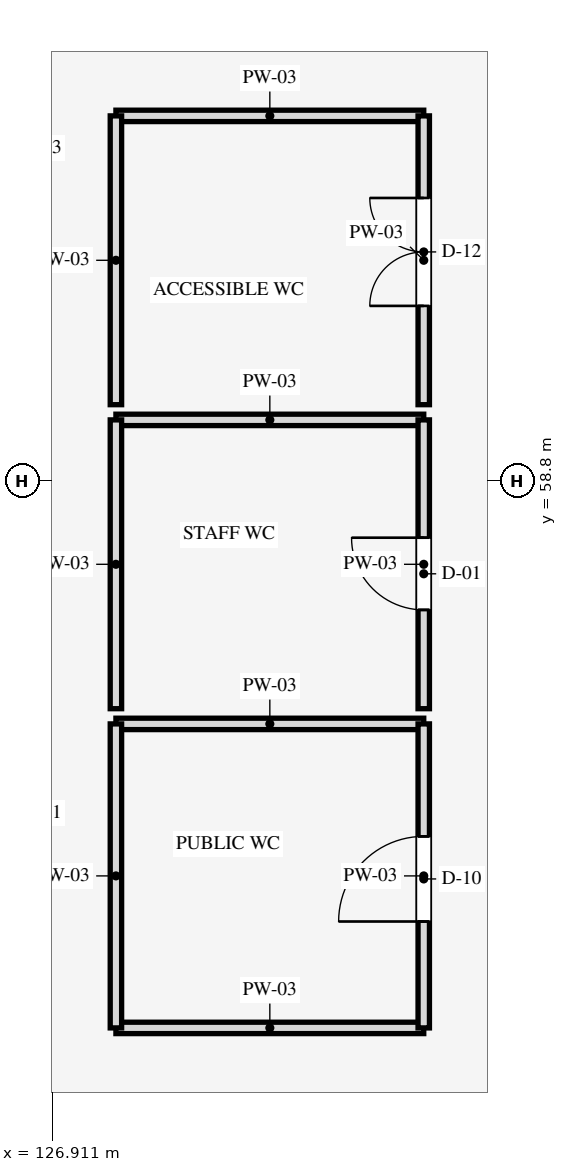
"""IFC4 building model, lengths in metres.
Left out: names, types, materials, properties, quantities, classifications, styles, units other than length and angle.
Written with IfcOpenShell. Run it as: python <this file> out.ifc"""

import sys

from ifc_helpers import new_model, si_unit, direction, frame, frame_2d, origin, place, context, subcontext, project, spatial, rectangle, extrude, element, fill, save


model = new_model("IFC4")
c1 = context("Model", 3, precision=1e-05, world=origin(), true_north=direction((0.0, 1.0)))
c2 = subcontext(c1, "Body", "Model", "MODEL_VIEW")
j1 = project(units=[si_unit("LENGTHUNIT", "METRE"), si_unit("PLANEANGLEUNIT", "RADIAN")], contexts=[c1])
p1 = place(None, origin())
s1 = spatial("IfcSite", under=j1, at=p1, CompositionType="ELEMENT")
p2 = place(p1, origin())
s2 = spatial("IfcBuilding", under=s1, at=p2, CompositionType="ELEMENT")
p3 = place(p2, frame((0.0, 0.0, 27.9)))
s3 = spatial("IfcBuildingStorey", under=s2, at=p3, CompositionType="ELEMENT", Elevation=27.9)
for number, where, z_axis, x_axis in (
    (1, (127.75, 51.6, 0.0), (0.0, 0.0, 1.0), (1.0, 0.0, 0.0)),
    (2, (127.75, 55.6, 0.0), (0.0, 0.0, 1.0), (1.0, 0.0, 0.0)),
):
    element("IfcWall", number, at=place(p3, frame(where, z_axis=z_axis, x_axis=x_axis)), inside=s3, PredefinedType="PARTITIONING", context=c2, shape_type="SweptSolid", body=[
        extrude(rectangle(XDim=4.05, YDim=0.15, at=frame_2d((2.025, 0.0))), origin(), (0.0, 0.0, 1.0), 3.24),
    ])
p4 = place(p3, frame((127.75, 51.6, 0.0), z_axis=(0.0, 0.0, 1.0), x_axis=(0.0, 1.0, 0.0)))
e3 = element("IfcWall", 3, at=p4, inside=s3, PredefinedType="PARTITIONING", context=c2, shape_type="SweptSolid", body=[
    extrude(rectangle(XDim=4.0, YDim=0.15, at=frame_2d((2.0, 0.0))), origin(), (0.0, 0.0, 1.0), 3.24),
])
p5 = place(p3, frame((131.8, 51.6, 0.0), z_axis=(0.0, 0.0, 1.0), x_axis=(0.0, 1.0, 0.0)))
e4 = element("IfcWall", 4, at=p5, inside=s3, PredefinedType="PARTITIONING", context=c2, shape_type="SweptSolid", body=[
    extrude(rectangle(XDim=4.0, YDim=0.15, at=frame_2d((2.0, 0.0))), origin(), (0.0, 0.0, 1.0), 3.24),
])
p6 = place(p5, frame((1.4, 0.0, 0.0)))
e5 = element("IfcOpeningElement", 5, at=p6, cuts=e4, PredefinedType="OPENING", context=c2, shape_type="SweptSolid", body=[
    extrude(rectangle(XDim=1.12, YDim=2.14, at=frame_2d((0.56, 1.07))), frame((0.0, 0.085, 0.0), z_axis=(0.0, -1.0, 0.0), x_axis=(1.0, 0.0, 0.0)), (0.0, 0.0, 1.0), 0.17),
])
p7 = place(p3, frame((127.75, 59.6, 0.0), z_axis=(0.0, 0.0, 1.0), x_axis=(1.0, 0.0, 0.0)))
e6 = element("IfcWall", 6, at=p7, inside=s3, PredefinedType="PARTITIONING", context=c2, shape_type="SweptSolid", body=[
    extrude(rectangle(XDim=4.05, YDim=0.15, at=frame_2d((2.025, 0.0))), origin(), (0.0, 0.0, 1.0), 3.24),
])
p8 = place(p3, frame((127.75, 55.8, 0.0), z_axis=(0.0, 0.0, 1.0), x_axis=(0.0, 1.0, 0.0)))
e7 = element("IfcWall", 7, at=p8, inside=s3, PredefinedType="PARTITIONING", context=c2, shape_type="SweptSolid", body=[
    extrude(rectangle(XDim=3.8, YDim=0.15, at=frame_2d((1.9, 0.0))), origin(), (0.0, 0.0, 1.0), 3.24),
])
p9 = place(p3, frame((131.8, 55.8, 0.0), z_axis=(0.0, 0.0, 1.0), x_axis=(0.0, 1.0, 0.0)))
e8 = element("IfcWall", 8, at=p9, inside=s3, PredefinedType="PARTITIONING", context=c2, shape_type="SweptSolid", body=[
    extrude(rectangle(XDim=3.8, YDim=0.15, at=frame_2d((1.9, 0.0))), origin(), (0.0, 0.0, 1.0), 3.24),
])
p10 = place(p9, frame((1.3, 0.0, 0.0)))
e9 = element("IfcOpeningElement", 9, at=p10, cuts=e8, PredefinedType="OPENING", context=c2, shape_type="SweptSolid", body=[
    extrude(rectangle(XDim=0.95, YDim=2.1, at=frame_2d((0.475, 1.05))), frame((0.0, 0.085, 0.0), z_axis=(0.0, -1.0, 0.0), x_axis=(1.0, 0.0, 0.0)), (0.0, 0.0, 1.0), 0.17),
])
p11 = place(p3, frame((127.75, 63.6, 0.0), z_axis=(0.0, 0.0, 1.0), x_axis=(1.0, 0.0, 0.0)))
e10 = element("IfcWall", 10, at=p11, inside=s3, PredefinedType="PARTITIONING", context=c2, shape_type="SweptSolid", body=[
    extrude(rectangle(XDim=4.05, YDim=0.15, at=frame_2d((2.025, 0.0))), origin(), (0.0, 0.0, 1.0), 3.24),
])
p12 = place(p3, frame((127.75, 59.8, 0.0), z_axis=(0.0, 0.0, 1.0), x_axis=(0.0, 1.0, 0.0)))
e11 = element("IfcWall", 11, at=p12, inside=s3, PredefinedType="PARTITIONING", context=c2, shape_type="SweptSolid", body=[
    extrude(rectangle(XDim=3.8, YDim=0.15, at=frame_2d((1.9, 0.0))), origin(), (0.0, 0.0, 1.0), 3.24),
])
p13 = place(p3, frame((131.8, 59.8, 0.0), z_axis=(0.0, 0.0, 1.0), x_axis=(0.0, 1.0, 0.0)))
e12 = element("IfcWall", 12, at=p13, inside=s3, PredefinedType="PARTITIONING", context=c2, shape_type="SweptSolid", body=[
    extrude(rectangle(XDim=3.8, YDim=0.15, at=frame_2d((1.9, 0.0))), origin(), (0.0, 0.0, 1.0), 3.24),
])
p14 = place(p13, frame((1.3, 0.0, 0.0)))
e13 = element("IfcOpeningElement", 13, at=p14, cuts=e12, PredefinedType="OPENING", context=c2, shape_type="SweptSolid", body=[
    extrude(rectangle(XDim=1.42, YDim=2.18, at=frame_2d((0.71, 1.09))), frame((0.0, 0.085, 0.0), z_axis=(0.0, -1.0, 0.0), x_axis=(1.0, 0.0, 0.0)), (0.0, 0.0, 1.0), 0.17),
])
p15 = place(p6, origin())
e14 = element("IfcDoor", 14, at=p15, inside=s3, OperationType="SINGLE_SWING_LEFT", PredefinedType="DOOR", context=c2, shape_type="SweptSolid", body=[
    extrude(rectangle(XDim=1.12, YDim=2.14, at=frame_2d((0.56, 1.07))), frame((0.0, 0.025, 0.0), z_axis=(0.0, -1.0, 0.0), x_axis=(1.0, 0.0, 0.0)), (0.0, 0.0, 1.0), 0.05),
])
fill(e5, e14)
p16 = place(p10, origin())
e15 = element("IfcDoor", 15, at=p16, inside=s3, OperationType="SINGLE_SWING_RIGHT", PredefinedType="DOOR", context=c2, shape_type="SweptSolid", body=[
    extrude(rectangle(XDim=0.95, YDim=2.1, at=frame_2d((0.475, 1.05))), frame((0.0, 0.025, 0.0), z_axis=(0.0, -1.0, 0.0), x_axis=(1.0, 0.0, 0.0)), (0.0, 0.0, 1.0), 0.05),
])
fill(e9, e15)
p17 = place(p14, origin())
e16 = element("IfcDoor", 16, at=p17, inside=s3, OperationType="DOUBLE_DOOR_SINGLE_SWING", PredefinedType="DOOR", context=c2, shape_type="SweptSolid", body=[
    extrude(rectangle(XDim=1.42, YDim=2.18, at=frame_2d((0.71, 1.09))), frame((0.0, 0.025, 0.0), z_axis=(0.0, -1.0, 0.0), x_axis=(1.0, 0.0, 0.0)), (0.0, 0.0, 1.0), 0.05),
])
fill(e13, e16)
save(model, sys.argv[1])
